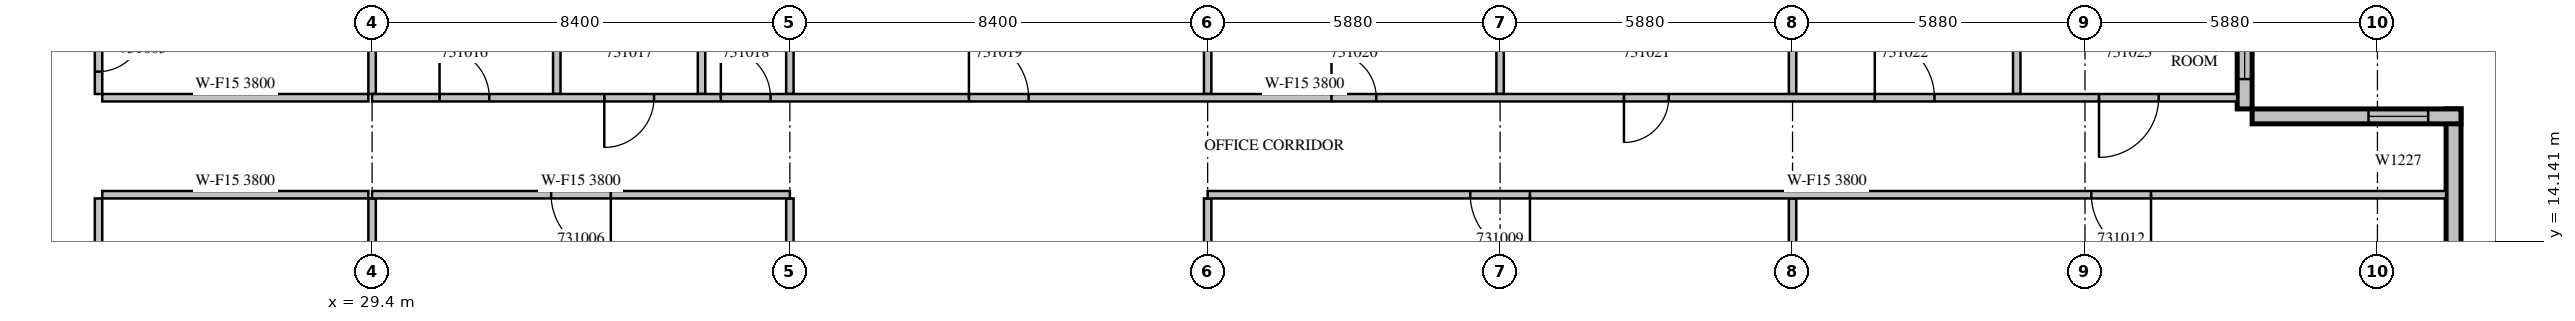
"""IFC4 building model, lengths in metres.
Left out: names, types, materials, properties, quantities, classifications, styles, units other than length and angle.
Written with IfcOpenShell. Run it as: python <this file> out.ifc"""

import sys

from ifc_helpers import new_model, si_unit, direction, frame, frame_2d, origin, place, context, subcontext, project, spatial, rectangle, extrude, source, transform, mapped, element, fill, save


model = new_model("IFC4")
c1 = context("Model", 3, precision=1e-05, world=origin(), true_north=direction((0.0, 1.0)))
c2 = subcontext(c1, "Body", "Model", "MODEL_VIEW")
j1 = project(units=[si_unit("LENGTHUNIT", "METRE"), si_unit("PLANEANGLEUNIT", "RADIAN")], contexts=[c1])
p1 = place(None, origin())
s1 = spatial("IfcSite", under=j1, at=p1, CompositionType="ELEMENT")
p2 = place(p1, origin())
s2 = spatial("IfcBuilding", under=s1, at=p2, CompositionType="ELEMENT")
p3 = place(p2, frame((0.0, 0.0, 141.3)))
s3 = spatial("IfcBuildingStorey", under=s2, at=p3, CompositionType="ELEMENT", Elevation=141.3)
m1 = source(origin(), c2, "Body", "SweptSolid", [
    extrude(rectangle(XDim=6.3, YDim=0.3, at=frame_2d((3.15, 0.0))), origin(), (0.0, 0.0, 1.0), 3.8),
])
p4 = place(p3, frame((71.25, 10.5, 0.0), z_axis=(0.0, 0.0, 1.0), x_axis=(0.0, 1.0, 0.0)))
e1 = element("IfcWall", 1, at=p4, inside=s3, PredefinedType="STANDARD", context=c2, shape_type="MappedRepresentation", body=[
    mapped(m1, transform((0.0, 0.0, 0.0), scale=1.0)),
])
m2 = source(origin(), c2, "Body", "SweptSolid", [
    extrude(rectangle(XDim=1.2, YDim=2.7, at=frame_2d((0.6, 1.35))), frame((0.0, 0.16, 0.0), z_axis=(0.0, -1.0, 0.0), x_axis=(1.0, 0.0, 0.0)), (0.0, 0.0, 1.0), 0.32),
])
p5 = place(p4, frame((1.025, 0.0, 0.6)))
e2 = element("IfcOpeningElement", 2, at=p5, cuts=e1, PredefinedType="OPENING", context=c2, shape_type="MappedRepresentation", body=[
    mapped(m2, transform((0.0, 0.0, 0.0), scale=1.0)),
])
m3 = source(origin(), c2, "Body", "SweptSolid", [
    extrude(rectangle(XDim=4.2, YDim=0.3, at=frame_2d((2.1, 0.0))), origin(), (0.0, 0.0, 1.0), 3.8),
])
p6 = place(p3, frame((71.4, 16.65, 0.0), z_axis=(0.0, 0.0, 1.0), x_axis=(-1.0, 0.0, 0.0)))
e3 = element("IfcWall", 3, at=p6, inside=s3, PredefinedType="STANDARD", context=c2, shape_type="MappedRepresentation", body=[
    mapped(m3, transform((0.0, 0.0, 0.0), scale=1.0)),
])
p7 = place(p6, frame((0.66, 0.0, 0.6)))
e4 = element("IfcOpeningElement", 4, at=p7, cuts=e3, PredefinedType="OPENING", context=c2, shape_type="MappedRepresentation", body=[
    mapped(m2, transform((0.0, 0.0, 0.0), scale=1.0)),
])
p8 = place(p3, frame((67.05, 16.8, 0.0), z_axis=(0.0, 0.0, 1.0), x_axis=(0.0, 1.0, 0.0)))
e5 = element("IfcWall", 5, at=p8, inside=s3, PredefinedType="STANDARD", context=c2, shape_type="MappedRepresentation", body=[
    mapped(m3, transform((0.0, 0.0, 0.0), scale=1.0)),
])
m4 = source(origin(), c2, "Body", "SweptSolid", [
    extrude(rectangle(XDim=3.0, YDim=2.7, at=frame_2d((1.5, 1.35))), frame((0.0, 0.16, 0.0), z_axis=(0.0, -1.0, 0.0), x_axis=(1.0, 0.0, 0.0)), (0.0, 0.0, 1.0), 0.32),
])
p9 = place(p8, frame((0.6, 0.0, 0.6)))
e6 = element("IfcOpeningElement", 6, at=p9, cuts=e5, PredefinedType="OPENING", context=c2, shape_type="MappedRepresentation", body=[
    mapped(m4, transform((0.0, 0.0, 0.0), scale=1.0)),
])
m5 = source(origin(), c2, "Body", "SweptSolid", [
    extrude(rectangle(XDim=11.725, YDim=0.15, at=frame_2d((5.862, 0.0))), origin(), (0.0, 0.0, 1.0), 3.8),
])
p10 = place(p3, frame((23.9, 15.0, 0.0), z_axis=(0.0, 0.0, 1.0), x_axis=(0.0, -1.0, 0.0)))
e7 = element("IfcWall", 7, at=p10, inside=s3, PredefinedType="PARTITIONING", context=c2, shape_type="MappedRepresentation", body=[
    mapped(m5, transform((0.0, 0.0, 0.0), scale=1.0)),
])
m6 = source(origin(), c2, "Body", "SweptSolid", [
    extrude(rectangle(XDim=0.9, YDim=2.1, at=frame_2d((0.45, 1.05))), frame((0.0, 0.085, 0.0), z_axis=(0.0, -1.0, 0.0), x_axis=(1.0, 0.0, 0.0)), (0.0, 0.0, 1.0), 0.17),
])
p11 = place(p10, frame((8.863, 0.0, 0.0)))
e8 = element("IfcOpeningElement", 8, at=p11, cuts=e7, PredefinedType="OPENING", context=c2, shape_type="MappedRepresentation", body=[
    mapped(m6, transform((0.0, 0.0, 0.0), scale=1.0)),
])
p12 = place(p10, frame((2.125, 0.0, 0.0)))
e9 = element("IfcOpeningElement", 9, at=p12, cuts=e7, PredefinedType="OPENING", context=c2, shape_type="MappedRepresentation", body=[
    mapped(m6, transform((0.0, 0.0, 0.0), scale=1.0)),
])
m7 = source(origin(), c2, "Body", "SweptSolid", [
    extrude(rectangle(XDim=3.6, YDim=0.15, at=frame_2d((1.8, 0.0))), origin(), (0.0, 0.0, 1.0), 3.8),
])
p13 = place(p3, frame((23.9, 20.7, 0.0), z_axis=(0.0, 0.0, 1.0), x_axis=(0.0, -1.0, 0.0)))
e10 = element("IfcWall", 10, at=p13, inside=s3, PredefinedType="PARTITIONING", context=c2, shape_type="MappedRepresentation", body=[
    mapped(m7, transform((0.0, 0.0, 0.0), scale=1.0)),
])
p14 = place(p13, frame((2.25, 0.0, 0.0)))
e11 = element("IfcOpeningElement", 11, at=p14, cuts=e10, PredefinedType="OPENING", context=c2, shape_type="MappedRepresentation", body=[
    mapped(m6, transform((0.0, 0.0, 0.0), scale=1.0)),
])
m8 = source(origin(), c2, "Body", "SweptSolid", [
    extrude(rectangle(XDim=5.35, YDim=0.15, at=frame_2d((2.675, 0.0))), origin(), (0.0, 0.0, 1.0), 3.8),
])
for number, where, z_axis, x_axis in (
    (12, (29.325, 15.075, 0.0), (0.0, 0.0, 1.0), (-1.0, 0.0, 0.0)),
    (13, (23.975, 17.025, 0.0), (0.0, 0.0, 1.0), (1.0, 0.0, 0.0)),
):
    element("IfcWall", number, at=place(p3, frame(where, z_axis=z_axis, x_axis=x_axis)), inside=s3, PredefinedType="PARTITIONING", context=c2, shape_type="MappedRepresentation", body=[
        mapped(m8, transform((0.0, 0.0, 0.0), scale=1.0)),
    ])
m9 = source(origin(), c2, "Body", "SweptSolid", [
    extrude(rectangle(XDim=3.976, YDim=0.15, at=frame_2d((1.988, 0.0))), origin(), (0.0, 0.0, 1.0), 3.8),
])
p15 = place(p3, frame((29.4, 11.024, 0.0), z_axis=(0.0, 0.0, 1.0), x_axis=(0.0, 1.0, 0.0)))
e14 = element("IfcWall", 14, at=p15, inside=s3, PredefinedType="PARTITIONING", context=c2, shape_type="MappedRepresentation", body=[
    mapped(m9, transform((0.0, 0.0, 0.0), scale=1.0)),
])
m10 = source(origin(), c2, "Body", "SweptSolid", [
    extrude(rectangle(XDim=2.851, YDim=0.15, at=frame_2d((1.425, 0.0))), origin(), (0.0, 0.0, 1.0), 3.8),
])
p16 = place(p3, frame((29.4, 17.1, 0.0), z_axis=(0.0, 0.0, 1.0), x_axis=(0.0, 1.0, 0.0)))
e15 = element("IfcWall", 15, at=p16, inside=s3, PredefinedType="PARTITIONING", context=c2, shape_type="MappedRepresentation", body=[
    mapped(m10, transform((0.0, 0.0, 0.0), scale=1.0)),
])
m11 = source(origin(), c2, "Body", "SweptSolid", [
    extrude(rectangle(XDim=3.825, YDim=0.15, at=frame_2d((1.913, 0.0))), origin(), (0.0, 0.0, 1.0), 3.8),
])
for number, where, z_axis, x_axis in (
    (16, (37.8, 11.175, 0.0), (0.0, 0.0, 1.0), (0.0, 1.0, 0.0)),
    (17, (46.2, 11.175, 0.0), (0.0, 0.0, 1.0), (0.0, 1.0, 0.0)),
    (18, (57.96, 11.175, 0.0), (0.0, 0.0, 1.0), (0.0, 1.0, 0.0)),
):
    element("IfcWall", number, at=place(p3, frame(where, z_axis=z_axis, x_axis=x_axis)), inside=s3, PredefinedType="PARTITIONING", context=c2, shape_type="MappedRepresentation", body=[
        mapped(m11, transform((0.0, 0.0, 0.0), scale=1.0)),
    ])
for number, where, z_axis, x_axis in (
    (19, (33.113, 20.7, 0.0), (0.0, 0.0, 1.0), (0.0, -1.0, 0.0)),
    (20, (36.024, 20.7, 0.0), (0.0, 0.0, 1.0), (0.0, -1.0, 0.0)),
):
    element("IfcWall", number, at=place(p3, frame(where, z_axis=z_axis, x_axis=x_axis)), inside=s3, PredefinedType="PARTITIONING", context=c2, shape_type="MappedRepresentation", body=[
        mapped(m7, transform((0.0, 0.0, 0.0), scale=1.0)),
    ])
p17 = place(p3, frame((52.08, 19.951, 0.0), z_axis=(0.0, 0.0, 1.0), x_axis=(0.0, -1.0, 0.0)))
e21 = element("IfcWall", 21, at=p17, inside=s3, PredefinedType="PARTITIONING", context=c2, shape_type="MappedRepresentation", body=[
    mapped(m10, transform((0.0, 0.0, 0.0), scale=1.0)),
])
p18 = place(p3, frame((62.468, 20.7, 0.0), z_axis=(0.0, 0.0, 1.0), x_axis=(0.0, -1.0, 0.0)))
e22 = element("IfcWall", 22, at=p18, inside=s3, PredefinedType="PARTITIONING", context=c2, shape_type="MappedRepresentation", body=[
    mapped(m7, transform((0.0, 0.0, 0.0), scale=1.0)),
])
for number, where, z_axis, x_axis in (
    (23, (37.8, 17.1, 0.0), (0.0, 0.0, 1.0), (0.0, 1.0, 0.0)),
    (24, (46.2, 17.1, 0.0), (0.0, 0.0, 1.0), (0.0, 1.0, 0.0)),
    (25, (57.96, 17.1, 0.0), (0.0, 0.0, 1.0), (0.0, 1.0, 0.0)),
):
    element("IfcWall", number, at=place(p3, frame(where, z_axis=z_axis, x_axis=x_axis)), inside=s3, PredefinedType="PARTITIONING", context=c2, shape_type="MappedRepresentation", body=[
        mapped(m10, transform((0.0, 0.0, 0.0), scale=1.0)),
    ])
m12 = source(origin(), c2, "Body", "SweptSolid", [
    extrude(rectangle(XDim=8.4, YDim=0.15, at=frame_2d((4.2, 0.0))), origin(), (0.0, 0.0, 1.0), 3.8),
])
p19 = place(p3, frame((37.8, 15.075, 0.0), z_axis=(0.0, 0.0, 1.0), x_axis=(-1.0, 0.0, 0.0)))
e26 = element("IfcWall", 26, at=p19, inside=s3, PredefinedType="PARTITIONING", context=c2, shape_type="MappedRepresentation", body=[
    mapped(m12, transform((0.0, 0.0, 0.0), scale=1.0)),
])
m13 = source(origin(), c2, "Body", "SweptSolid", [
    extrude(rectangle(XDim=1.2, YDim=2.1, at=frame_2d((0.6, 1.05))), frame((0.0, 0.085, 0.0), z_axis=(0.0, -1.0, 0.0), x_axis=(1.0, 0.0, 0.0)), (0.0, 0.0, 1.0), 0.17),
])
p20 = place(p19, frame((3.6, 0.0, 0.0)))
e27 = element("IfcOpeningElement", 27, at=p20, cuts=e26, PredefinedType="OPENING", context=c2, shape_type="MappedRepresentation", body=[
    mapped(m13, transform((0.0, 0.0, 0.0), scale=1.0)),
])
m14 = source(origin(), c2, "Body", "SweptSolid", [
    extrude(rectangle(XDim=24.9, YDim=0.15, at=frame_2d((12.45, 0.0))), origin(), (0.0, 0.0, 1.0), 3.8),
])
p21 = place(p3, frame((71.1, 15.075, 0.0), z_axis=(0.0, 0.0, 1.0), x_axis=(-1.0, 0.0, 0.0)))
e28 = element("IfcWall", 28, at=p21, inside=s3, PredefinedType="PARTITIONING", context=c2, shape_type="MappedRepresentation", body=[
    mapped(m14, transform((0.0, 0.0, 0.0), scale=1.0)),
])
p22 = place(p21, frame((18.42, 0.0, 0.0)))
e29 = element("IfcOpeningElement", 29, at=p22, cuts=e28, PredefinedType="OPENING", context=c2, shape_type="MappedRepresentation", body=[
    mapped(m13, transform((0.0, 0.0, 0.0), scale=1.0)),
])
p23 = place(p21, frame((5.933, 0.0, 0.0)))
e30 = element("IfcOpeningElement", 30, at=p23, cuts=e28, PredefinedType="OPENING", context=c2, shape_type="MappedRepresentation", body=[
    mapped(m13, transform((0.0, 0.0, 0.0), scale=1.0)),
])
m15 = source(origin(), c2, "Body", "SweptSolid", [
    extrude(rectangle(XDim=37.5, YDim=0.15, at=frame_2d((18.75, 0.0))), origin(), (0.0, 0.0, 1.0), 3.8),
])
p24 = place(p3, frame((29.4, 17.025, 0.0), z_axis=(0.0, 0.0, 1.0), x_axis=(1.0, 0.0, 0.0)))
e31 = element("IfcWall", 31, at=p24, inside=s3, PredefinedType="PARTITIONING", context=c2, shape_type="MappedRepresentation", body=[
    mapped(m15, transform((0.0, 0.0, 0.0), scale=1.0)),
])
m16 = source(origin(), c2, "Body", "SweptSolid", [
    extrude(rectangle(XDim=1.0, YDim=2.1, at=frame_2d((0.5, 1.05))), frame((0.0, 0.085, 0.0), z_axis=(0.0, -1.0, 0.0), x_axis=(1.0, 0.0, 0.0)), (0.0, 0.0, 1.0), 0.17),
])
p25 = place(p24, frame((1.357, 0.0, 0.0)))
e32 = element("IfcOpeningElement", 32, at=p25, cuts=e31, PredefinedType="OPENING", context=c2, shape_type="MappedRepresentation", body=[
    mapped(m16, transform((0.0, 0.0, 0.0), scale=1.0)),
])
p26 = place(p24, frame((4.669, 0.0, 0.0)))
e33 = element("IfcOpeningElement", 33, at=p26, cuts=e31, PredefinedType="OPENING", context=c2, shape_type="MappedRepresentation", body=[
    mapped(m16, transform((0.0, 0.0, 0.0), scale=1.0)),
])
p27 = place(p24, frame((7.012, 0.0, 0.0)))
e34 = element("IfcOpeningElement", 34, at=p27, cuts=e31, PredefinedType="OPENING", context=c2, shape_type="MappedRepresentation", body=[
    mapped(m16, transform((0.0, 0.0, 0.0), scale=1.0)),
])
p28 = place(p24, frame((12.0, 0.0, 0.0)))
e35 = element("IfcOpeningElement", 35, at=p28, cuts=e31, PredefinedType="OPENING", context=c2, shape_type="MappedRepresentation", body=[
    mapped(m13, transform((0.0, 0.0, 0.0), scale=1.0)),
])
p29 = place(p24, frame((19.29, 0.0, 0.0)))
e36 = element("IfcOpeningElement", 36, at=p29, cuts=e31, PredefinedType="OPENING", context=c2, shape_type="MappedRepresentation", body=[
    mapped(m6, transform((0.0, 0.0, 0.0), scale=1.0)),
])
p30 = place(p24, frame((25.17, 0.0, 0.0)))
e37 = element("IfcOpeningElement", 37, at=p30, cuts=e31, PredefinedType="OPENING", context=c2, shape_type="MappedRepresentation", body=[
    mapped(m6, transform((0.0, 0.0, 0.0), scale=1.0)),
])
p31 = place(p24, frame((30.214, 0.0, 0.0)))
e38 = element("IfcOpeningElement", 38, at=p31, cuts=e31, PredefinedType="OPENING", context=c2, shape_type="MappedRepresentation", body=[
    mapped(m13, transform((0.0, 0.0, 0.0), scale=1.0)),
])
p32 = place(p24, frame((34.721, 0.0, 0.0)))
e39 = element("IfcOpeningElement", 39, at=p32, cuts=e31, PredefinedType="OPENING", context=c2, shape_type="MappedRepresentation", body=[
    mapped(m13, transform((0.0, 0.0, 0.0), scale=1.0)),
])
m17 = source(origin(), c2, "Body", "SweptSolid", [
    extrude(rectangle(XDim=1.2, YDim=2.7, at=frame_2d((0.6, 1.35))), frame((0.0, 0.03, 0.0), z_axis=(0.0, -1.0, 0.0), x_axis=(1.0, 0.0, 0.0)), (0.0, 0.0, 1.0), 0.06),
])
p33 = place(p7, origin())
e40 = element("IfcWindow", 40, at=p33, inside=s3, PartitioningType="SINGLE_PANEL", PredefinedType="WINDOW", context=c2, shape_type="MappedRepresentation", body=[
    mapped(m17, transform((0.0, 0.0, 0.0), scale=1.0)),
])
fill(e4, e40)
m18 = source(origin(), c2, "Body", "SweptSolid", [
    extrude(rectangle(XDim=3.0, YDim=2.7, at=frame_2d((1.5, 1.35))), frame((0.0, 0.03, 0.0), z_axis=(0.0, -1.0, 0.0), x_axis=(1.0, 0.0, 0.0)), (0.0, 0.0, 1.0), 0.06),
])
p34 = place(p9, origin())
e41 = element("IfcWindow", 41, at=p34, inside=s3, PartitioningType="SINGLE_PANEL", PredefinedType="WINDOW", context=c2, shape_type="MappedRepresentation", body=[
    mapped(m18, transform((0.0, 0.0, 0.0), scale=1.0)),
])
fill(e6, e41)
m19 = source(origin(), c2, "Body", "SweptSolid", [
    extrude(rectangle(XDim=0.9, YDim=2.1, at=frame_2d((0.45, 1.05))), frame((0.0, 0.025, 0.0), z_axis=(0.0, -1.0, 0.0), x_axis=(1.0, 0.0, 0.0)), (0.0, 0.0, 1.0), 0.05),
])
p35 = place(p14, origin())
e42 = element("IfcDoor", 42, at=p35, inside=s3, OperationType="SINGLE_SWING_LEFT", PredefinedType="DOOR", context=c2, shape_type="MappedRepresentation", body=[
    mapped(m19, transform((0.0, 0.0, 0.0), scale=1.0)),
])
fill(e11, e42)
m20 = source(origin(), c2, "Body", "SweptSolid", [
    extrude(rectangle(XDim=1.2, YDim=2.1, at=frame_2d((0.6, 1.05))), frame((0.0, 0.025, 0.0), z_axis=(0.0, -1.0, 0.0), x_axis=(1.0, 0.0, 0.0)), (0.0, 0.0, 1.0), 0.05),
])
p36 = place(p20, origin())
e43 = element("IfcDoor", 43, at=p36, inside=s3, OperationType="SINGLE_SWING_LEFT", PredefinedType="DOOR", context=c2, shape_type="MappedRepresentation", body=[
    mapped(m20, transform((0.0, 0.0, 0.0), scale=1.0)),
])
fill(e27, e43)
p37 = place(p22, origin())
e44 = element("IfcDoor", 44, at=p37, inside=s3, OperationType="SINGLE_SWING_LEFT", PredefinedType="DOOR", context=c2, shape_type="MappedRepresentation", body=[
    mapped(m20, transform((0.0, 0.0, 0.0), scale=1.0)),
])
fill(e29, e44)
p38 = place(p23, origin())
e45 = element("IfcDoor", 45, at=p38, inside=s3, OperationType="SINGLE_SWING_LEFT", PredefinedType="DOOR", context=c2, shape_type="MappedRepresentation", body=[
    mapped(m20, transform((0.0, 0.0, 0.0), scale=1.0)),
])
fill(e30, e45)
m21 = source(origin(), c2, "Body", "SweptSolid", [
    extrude(rectangle(XDim=1.0, YDim=2.1, at=frame_2d((0.5, 1.05))), frame((0.0, 0.025, 0.0), z_axis=(0.0, -1.0, 0.0), x_axis=(1.0, 0.0, 0.0)), (0.0, 0.0, 1.0), 0.05),
])
p39 = place(p25, origin())
e46 = element("IfcDoor", 46, at=p39, inside=s3, OperationType="SINGLE_SWING_LEFT", PredefinedType="DOOR", context=c2, shape_type="MappedRepresentation", body=[
    mapped(m21, transform((0.0, 0.0, 0.0), scale=1.0)),
])
fill(e32, e46)
p40 = place(p26, origin())
e47 = element("IfcDoor", 47, at=p40, inside=s3, OperationType="SINGLE_SWING_RIGHT", PredefinedType="DOOR", context=c2, shape_type="MappedRepresentation", body=[
    mapped(m21, transform((0.0, 0.0, 0.0), scale=1.0)),
])
fill(e33, e47)
p41 = place(p27, origin())
e48 = element("IfcDoor", 48, at=p41, inside=s3, OperationType="SINGLE_SWING_LEFT", PredefinedType="DOOR", context=c2, shape_type="MappedRepresentation", body=[
    mapped(m21, transform((0.0, 0.0, 0.0), scale=1.0)),
])
fill(e34, e48)
p42 = place(p28, origin())
e49 = element("IfcDoor", 49, at=p42, inside=s3, OperationType="SINGLE_SWING_LEFT", PredefinedType="DOOR", context=c2, shape_type="MappedRepresentation", body=[
    mapped(m20, transform((0.0, 0.0, 0.0), scale=1.0)),
])
fill(e35, e49)
p43 = place(p29, origin())
e50 = element("IfcDoor", 50, at=p43, inside=s3, OperationType="SINGLE_SWING_LEFT", PredefinedType="DOOR", context=c2, shape_type="MappedRepresentation", body=[
    mapped(m19, transform((0.0, 0.0, 0.0), scale=1.0)),
])
fill(e36, e50)
p44 = place(p30, origin())
e51 = element("IfcDoor", 51, at=p44, inside=s3, OperationType="SINGLE_SWING_RIGHT", PredefinedType="DOOR", context=c2, shape_type="MappedRepresentation", body=[
    mapped(m19, transform((0.0, 0.0, 0.0), scale=1.0)),
])
fill(e37, e51)
p45 = place(p31, origin())
e52 = element("IfcDoor", 52, at=p45, inside=s3, OperationType="SINGLE_SWING_LEFT", PredefinedType="DOOR", context=c2, shape_type="MappedRepresentation", body=[
    mapped(m20, transform((0.0, 0.0, 0.0), scale=1.0)),
])
fill(e38, e52)
p46 = place(p32, origin())
e53 = element("IfcDoor", 53, at=p46, inside=s3, OperationType="SINGLE_SWING_RIGHT", PredefinedType="DOOR", context=c2, shape_type="MappedRepresentation", body=[
    mapped(m20, transform((0.0, 0.0, 0.0), scale=1.0)),
])
fill(e39, e53)
save(model, sys.argv[1])
